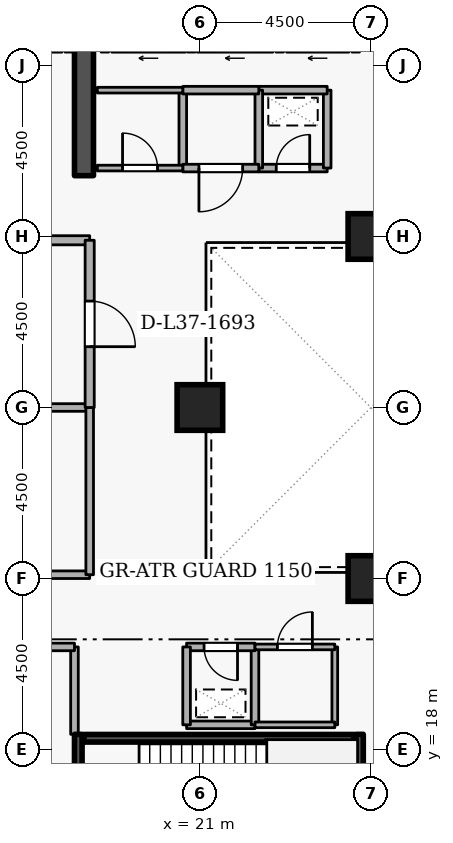
"""IFC4 building model, lengths in metres.
Left out: names, types, materials, properties, quantities, classifications, styles, units other than length and angle.
Written with IfcOpenShell. Run it as: python <this file> out.ifc"""

import sys

from ifc_helpers import new_model, si_unit, direction, frame, frame_2d, origin, origin_2d, place, context, subcontext, project, spatial, rectangle, extrude, element, fill, save


model = new_model("IFC4")
c1 = context("Model", 3, precision=1e-05, world=origin(), true_north=direction((0.0, 1.0)))
c2 = subcontext(c1, "Body", "Model", "MODEL_VIEW")
j1 = project(units=[si_unit("LENGTHUNIT", "METRE"), si_unit("PLANEANGLEUNIT", "RADIAN")], contexts=[c1])
p1 = place(None, origin())
s1 = spatial("IfcSite", under=j1, at=p1, CompositionType="ELEMENT")
p2 = place(p1, origin())
s2 = spatial("IfcBuilding", under=s1, at=p2, CompositionType="ELEMENT")
p3 = place(p2, frame((0.0, 0.0, 141.3)))
s3 = spatial("IfcBuildingStorey", under=s2, at=p3, CompositionType="ELEMENT", Elevation=141.3)
p4 = place(p3, frame((17.95, 33.1, 0.0), z_axis=(0.0, 0.0, 1.0), x_axis=(0.0, 1.0, 0.0)))
e1 = element("IfcWall", 1, at=p4, inside=s3, PredefinedType="SHEAR", context=c2, shape_type="SweptSolid", body=[
    extrude(rectangle(XDim=5.8, YDim=0.5, at=frame_2d((2.9, 0.0))), origin(), (0.0, 0.0, 1.0), 4.2),
])
for number, where, z_axis, x_axis in (
    (2, (25.5, 22.5, 0.0), (0.0, 0.0, 1.0), (1.0, 0.0, 0.0)),
    (3, (25.5, 31.5, 0.0), (0.0, 0.0, 1.0), (1.0, 0.0, 0.0)),
    (4, (21.0, 27.0, 0.0), (0.0, 0.0, 1.0), (1.0, 0.0, 0.0)),
):
    element("IfcColumn", number, at=place(p3, frame(where, z_axis=z_axis, x_axis=x_axis)), inside=s3, PredefinedType="COLUMN", context=c2, shape_type="SweptSolid", body=[
        extrude(rectangle(XDim=1.2, YDim=1.2, at=origin_2d()), origin(), (0.0, 0.0, 1.0), 4.2),
    ])
p5 = place(p3, frame((24.92, 36.45, 0.0), z_axis=(0.0, 0.0, 1.0), x_axis=(-1.0, 0.0, 0.0)))
e5 = element("IfcWall", 5, at=p5, inside=s3, PredefinedType="STANDARD", context=c2, shape_type="SweptSolid", body=[
    extrude(rectangle(XDim=1.64, YDim=0.2, at=frame_2d((0.82, 0.0))), origin(), (0.0, 0.0, 1.0), 3.94),
])
p6 = place(p5, frame((0.31, 0.0, 0.0)))
e6 = element("IfcOpeningElement", 6, at=p6, cuts=e5, PredefinedType="OPENING", context=c2, shape_type="SweptSolid", body=[
    extrude(rectangle(XDim=1.02, YDim=2.06, at=frame_2d((0.51, 1.03))), frame((0.0, 0.11, 0.0), z_axis=(0.0, -1.0, 0.0), x_axis=(1.0, 0.0, 0.0)), (0.0, 0.0, 1.0), 0.22),
])
p7 = place(p3, frame((22.92, 36.45, 0.0), z_axis=(0.0, 0.0, 1.0), x_axis=(-1.0, 0.0, 0.0)))
e7 = element("IfcWall", 7, at=p7, inside=s3, PredefinedType="STANDARD", context=c2, shape_type="SweptSolid", body=[
    extrude(rectangle(XDim=1.99, YDim=0.2, at=frame_2d((0.995, 0.0))), origin(), (0.0, 0.0, 1.0), 3.94),
])
p8 = place(p7, frame((0.485, 0.0, 0.0)))
e8 = element("IfcOpeningElement", 8, at=p8, cuts=e7, PredefinedType="OPENING", context=c2, shape_type="SweptSolid", body=[
    extrude(rectangle(XDim=1.02, YDim=2.06, at=frame_2d((0.51, 1.03))), frame((0.0, 0.11, 0.0), z_axis=(0.0, -1.0, 0.0), x_axis=(1.0, 0.0, 0.0)), (0.0, 0.0, 1.0), 0.22),
])
p9 = place(p3, frame((20.62, 36.45, 0.0), z_axis=(0.0, 0.0, 1.0), x_axis=(-1.0, 0.0, 0.0)))
e9 = element("IfcWall", 9, at=p9, inside=s3, PredefinedType="STANDARD", context=c2, shape_type="SweptSolid", body=[
    extrude(rectangle(XDim=1.94, YDim=0.2, at=frame_2d((0.97, 0.0))), origin(), (0.0, 0.0, 1.0), 3.94),
])
p10 = place(p9, frame((0.46, 0.0, 0.0)))
e10 = element("IfcOpeningElement", 10, at=p10, cuts=e9, PredefinedType="OPENING", context=c2, shape_type="SweptSolid", body=[
    extrude(rectangle(XDim=1.02, YDim=2.06, at=frame_2d((0.51, 1.03))), frame((0.0, 0.11, 0.0), z_axis=(0.0, -1.0, 0.0), x_axis=(1.0, 0.0, 0.0)), (0.0, 0.0, 1.0), 0.22),
])
p11 = place(p3, frame((17.37, 36.45, 0.0), z_axis=(0.0, 0.0, 1.0), x_axis=(-1.0, 0.0, 0.0)))
e11 = element("IfcWall", 11, at=p11, inside=s3, PredefinedType="STANDARD", context=c2, shape_type="SweptSolid", body=[
    extrude(rectangle(XDim=1.74, YDim=0.2, at=frame_2d((0.87, 0.0))), origin(), (0.0, 0.0, 1.0), 3.94),
])
p12 = place(p11, frame((0.36, 0.0, 0.0)))
e12 = element("IfcOpeningElement", 12, at=p12, cuts=e11, PredefinedType="OPENING", context=c2, shape_type="SweptSolid", body=[
    extrude(rectangle(XDim=1.02, YDim=2.06, at=frame_2d((0.51, 1.03))), frame((0.0, 0.11, 0.0), z_axis=(0.0, -1.0, 0.0), x_axis=(1.0, 0.0, 0.0)), (0.0, 0.0, 1.0), 0.22),
])
p13 = place(p3, frame((17.8, 15.05, 0.0), z_axis=(0.0, 0.0, 1.0), x_axis=(0.0, 1.0, 0.0)))
e13 = element("IfcWall", 13, at=p13, inside=s3, PredefinedType="SHEAR", context=c2, shape_type="SweptSolid", body=[
    extrude(rectangle(XDim=3.35, YDim=0.2, at=frame_2d((1.675, 0.0))), origin(), (0.0, 0.0, 1.0), 4.2),
])
p14 = place(p13, frame((1.125, 0.0, 0.0)))
e14 = element("IfcOpeningElement", 14, at=p14, cuts=e13, PredefinedType="OPENING", context=c2, shape_type="SweptSolid", body=[
    extrude(rectangle(XDim=1.1, YDim=2.1, at=frame_2d((0.55, 1.05))), frame((0.0, 0.11, 0.0), z_axis=(0.0, -1.0, 0.0), x_axis=(1.0, 0.0, 0.0)), (0.0, 0.0, 1.0), 0.22),
])
p15 = place(p3, frame((25.2, 18.4, 0.0), z_axis=(0.0, 0.0, 1.0), x_axis=(0.0, -1.0, 0.0)))
e15 = element("IfcWall", 15, at=p15, inside=s3, PredefinedType="SHEAR", context=c2, shape_type="SweptSolid", body=[
    extrude(rectangle(XDim=3.35, YDim=0.2, at=frame_2d((1.675, 0.0))), origin(), (0.0, 0.0, 1.0), 4.2),
])
p16 = place(p3, frame((25.05, 18.297, 0.0), z_axis=(0.0, 0.0, 1.0), x_axis=(-1.0, 0.0, 0.0)))
e16 = element("IfcWall", 16, at=p16, inside=s3, PredefinedType="SHEAR", context=c2, shape_type="SweptSolid", body=[
    extrude(rectangle(XDim=7.1, YDim=0.2, at=frame_2d((3.55, 0.0))), origin(), (0.0, 0.0, 1.0), 4.2),
])
p17 = place(p3, frame((17.7, 18.4, 0.0), z_axis=(0.0, 0.0, 1.0), x_axis=(0.0, 1.0, 0.0)))
e17 = element("IfcWall", 17, at=p17, inside=s3, PredefinedType="STANDARD", context=c2, shape_type="SweptSolid", body=[
    extrude(rectangle(XDim=2.3, YDim=0.2, at=frame_2d((1.15, 0.0))), origin(), (0.0, 0.0, 1.0), 3.145),
])
p18 = place(p3, frame((17.7, 20.7, 0.0), z_axis=(0.0, 0.0, 1.0), x_axis=(-1.0, 0.0, 0.0)))
e18 = element("IfcWall", 18, at=p18, inside=s3, PredefinedType="STANDARD", context=c2, shape_type="SweptSolid", body=[
    extrude(rectangle(XDim=2.5, YDim=0.2, at=frame_2d((1.25, 0.0))), origin(), (0.0, 0.0, 1.0), 3.94),
])
p19 = place(p18, frame((0.675, 0.0, 0.0)))
e19 = element("IfcOpeningElement", 19, at=p19, cuts=e18, PredefinedType="OPENING", context=c2, shape_type="SweptSolid", body=[
    extrude(rectangle(XDim=1.15, YDim=2.1, at=frame_2d((0.575, 1.05))), frame((0.0, 0.11, 0.0), z_axis=(0.0, -1.0, 0.0), x_axis=(1.0, 0.0, 0.0)), (0.0, 0.0, 1.0), 0.22),
])
p20 = place(p3, frame((20.65, 18.65, 0.0), z_axis=(0.0, 0.0, 1.0), x_axis=(1.0, 0.0, 0.0)))
e20 = element("IfcWall", 20, at=p20, inside=s3, PredefinedType="STANDARD", context=c2, shape_type="SweptSolid", body=[
    extrude(rectangle(XDim=1.8, YDim=0.2, at=frame_2d((0.9, 0.0))), origin(), (0.0, 0.0, 1.0), 3.94),
])
p21 = place(p3, frame((22.45, 18.65, 0.0), z_axis=(0.0, 0.0, 1.0), x_axis=(0.0, 1.0, 0.0)))
e21 = element("IfcWall", 21, at=p21, inside=s3, PredefinedType="STANDARD", context=c2, shape_type="SweptSolid", body=[
    extrude(rectangle(XDim=2.05, YDim=0.2, at=frame_2d((1.025, 0.0))), origin(), (0.0, 0.0, 1.0), 3.94),
])
p22 = place(p3, frame((22.45, 20.7, 0.0), z_axis=(0.0, 0.0, 1.0), x_axis=(-1.0, 0.0, 0.0)))
e22 = element("IfcWall", 22, at=p22, inside=s3, PredefinedType="STANDARD", context=c2, shape_type="SweptSolid", body=[
    extrude(rectangle(XDim=1.8, YDim=0.2, at=frame_2d((0.9, 0.0))), origin(), (0.0, 0.0, 1.0), 3.94),
])
p23 = place(p22, frame((0.46, 0.0, 0.0)))
e23 = element("IfcOpeningElement", 23, at=p23, cuts=e22, PredefinedType="OPENING", context=c2, shape_type="SweptSolid", body=[
    extrude(rectangle(XDim=0.88, YDim=2.04, at=frame_2d((0.44, 1.02))), frame((0.0, 0.11, 0.0), z_axis=(0.0, -1.0, 0.0), x_axis=(1.0, 0.0, 0.0)), (0.0, 0.0, 1.0), 0.22),
])
p24 = place(p3, frame((20.65, 20.7, 0.0), z_axis=(0.0, 0.0, 1.0), x_axis=(0.0, -1.0, 0.0)))
e24 = element("IfcWall", 24, at=p24, inside=s3, PredefinedType="STANDARD", context=c2, shape_type="SweptSolid", body=[
    extrude(rectangle(XDim=2.05, YDim=0.2, at=frame_2d((1.025, 0.0))), origin(), (0.0, 0.0, 1.0), 3.94),
])
p25 = place(p3, frame((22.55, 33.3, 0.0), z_axis=(0.0, 0.0, 1.0), x_axis=(1.0, 0.0, 0.0)))
e25 = element("IfcWall", 25, at=p25, inside=s3, PredefinedType="STANDARD", context=c2, shape_type="SweptSolid", body=[
    extrude(rectangle(XDim=1.8, YDim=0.2, at=frame_2d((0.9, 0.0))), origin(), (0.0, 0.0, 1.0), 3.94),
])
p26 = place(p25, frame((0.46, 0.0, 0.0)))
e26 = element("IfcOpeningElement", 26, at=p26, cuts=e25, PredefinedType="OPENING", context=c2, shape_type="SweptSolid", body=[
    extrude(rectangle(XDim=0.88, YDim=2.04, at=frame_2d((0.44, 1.02))), frame((0.0, 0.11, 0.0), z_axis=(0.0, -1.0, 0.0), x_axis=(1.0, 0.0, 0.0)), (0.0, 0.0, 1.0), 0.22),
])
p27 = place(p3, frame((24.35, 33.3, 0.0), z_axis=(0.0, 0.0, 1.0), x_axis=(0.0, 1.0, 0.0)))
e27 = element("IfcWall", 27, at=p27, inside=s3, PredefinedType="STANDARD", context=c2, shape_type="SweptSolid", body=[
    extrude(rectangle(XDim=2.05, YDim=0.2, at=frame_2d((1.025, 0.0))), origin(), (0.0, 0.0, 1.0), 3.94),
])
p28 = place(p3, frame((24.35, 35.35, 0.0), z_axis=(0.0, 0.0, 1.0), x_axis=(-1.0, 0.0, 0.0)))
e28 = element("IfcWall", 28, at=p28, inside=s3, PredefinedType="STANDARD", context=c2, shape_type="SweptSolid", body=[
    extrude(rectangle(XDim=1.8, YDim=0.2, at=frame_2d((0.9, 0.0))), origin(), (0.0, 0.0, 1.0), 3.94),
])
for number, where, z_axis, x_axis in (
    (29, (22.55, 35.35, 0.0), (0.0, 0.0, 1.0), (0.0, -1.0, 0.0)),
    (30, (20.55, 33.3, 0.0), (0.0, 0.0, 1.0), (0.0, 1.0, 0.0)),
):
    element("IfcWall", number, at=place(p3, frame(where, z_axis=z_axis, x_axis=x_axis)), inside=s3, PredefinedType="STANDARD", context=c2, shape_type="SweptSolid", body=[
        extrude(rectangle(XDim=2.05, YDim=0.2, at=frame_2d((1.025, 0.0))), origin(), (0.0, 0.0, 1.0), 3.94),
    ])
p29 = place(p3, frame((20.55, 35.35, 0.0), z_axis=(0.0, 0.0, 1.0), x_axis=(1.0, 0.0, 0.0)))
e31 = element("IfcWall", 31, at=p29, inside=s3, PredefinedType="STANDARD", context=c2, shape_type="SweptSolid", body=[
    extrude(rectangle(XDim=2.0, YDim=0.2, at=frame_2d((1.0, 0.0))), origin(), (0.0, 0.0, 1.0), 3.94),
])
p30 = place(p3, frame((22.55, 33.3, 0.0), z_axis=(0.0, 0.0, 1.0), x_axis=(-1.0, 0.0, 0.0)))
e32 = element("IfcWall", 32, at=p30, inside=s3, PredefinedType="STANDARD", context=c2, shape_type="SweptSolid", body=[
    extrude(rectangle(XDim=2.0, YDim=0.2, at=frame_2d((1.0, 0.0))), origin(), (0.0, 0.0, 1.0), 3.94),
])
p31 = place(p30, frame((0.425, 0.0, 0.0)))
e33 = element("IfcOpeningElement", 33, at=p31, cuts=e32, PredefinedType="OPENING", context=c2, shape_type="SweptSolid", body=[
    extrude(rectangle(XDim=1.15, YDim=2.1, at=frame_2d((0.575, 1.05))), frame((0.0, 0.11, 0.0), z_axis=(0.0, -1.0, 0.0), x_axis=(1.0, 0.0, 0.0)), (0.0, 0.0, 1.0), 0.22),
])
p32 = place(p3, frame((18.1, 22.6, 0.0), z_axis=(0.0, 0.0, 1.0), x_axis=(-1.0, 0.0, 0.0)))
e34 = element("IfcWall", 34, at=p32, inside=s3, PredefinedType="STANDARD", context=c2, shape_type="SweptSolid", body=[
    extrude(rectangle(XDim=2.9, YDim=0.2, at=frame_2d((1.45, 0.0))), origin(), (0.0, 0.0, 1.0), 3.94),
])
p33 = place(p3, frame((5.45, 27.0, 0.0), z_axis=(0.0, 0.0, 1.0), x_axis=(1.0, 0.0, 0.0)))
e35 = element("IfcWall", 35, at=p33, inside=s3, PredefinedType="STANDARD", context=c2, shape_type="SweptSolid", body=[
    extrude(rectangle(XDim=12.65, YDim=0.2, at=frame_2d((6.325, 0.0))), origin(), (0.0, 0.0, 1.0), 3.325),
])
p34 = place(p3, frame((18.1, 27.0, 0.0), z_axis=(0.0, 0.0, 1.0), x_axis=(0.0, -1.0, 0.0)))
e36 = element("IfcWall", 36, at=p34, inside=s3, PredefinedType="STANDARD", context=c2, shape_type="SweptSolid", body=[
    extrude(rectangle(XDim=4.4, YDim=0.2, at=frame_2d((2.2, 0.0))), origin(), (0.0, 0.0, 1.0), 3.145),
])
p35 = place(p3, frame((15.2, 31.4, 0.0), z_axis=(0.0, 0.0, 1.0), x_axis=(1.0, 0.0, 0.0)))
e37 = element("IfcWall", 37, at=p35, inside=s3, PredefinedType="STANDARD", context=c2, shape_type="SweptSolid", body=[
    extrude(rectangle(XDim=2.9, YDim=0.24, at=frame_2d((1.45, 0.0))), origin(), (0.0, 0.0, 1.0), 3.94),
])
p36 = place(p3, frame((18.1, 31.4, 0.0), z_axis=(0.0, 0.0, 1.0), x_axis=(0.0, -1.0, 0.0)))
e38 = element("IfcWall", 38, at=p36, inside=s3, PredefinedType="STANDARD", context=c2, shape_type="SweptSolid", body=[
    extrude(rectangle(XDim=4.4, YDim=0.24, at=frame_2d((2.2, 0.0))), origin(), (0.0, 0.0, 1.0), 3.145),
])
p37 = place(p36, frame((1.6, 0.0, 0.0)))
e39 = element("IfcOpeningElement", 39, at=p37, cuts=e38, PredefinedType="OPENING", context=c2, shape_type="SweptSolid", body=[
    extrude(rectangle(XDim=1.2, YDim=2.1, at=frame_2d((0.6, 1.05))), frame((0.0, 0.13, 0.0), z_axis=(0.0, -1.0, 0.0), x_axis=(1.0, 0.0, 0.0)), (0.0, 0.0, 1.0), 0.26),
])
p38 = place(p3, frame((24.55, 20.7, 0.0), z_axis=(0.0, 0.0, 1.0), x_axis=(0.0, -1.0, 0.0)))
e40 = element("IfcWall", 40, at=p38, inside=s3, PredefinedType="PARTITIONING", context=c2, shape_type="SweptSolid", body=[
    extrude(rectangle(XDim=2.05, YDim=0.15, at=frame_2d((1.025, 0.0))), origin(), (0.0, 0.0, 1.0), 3.94),
])
p39 = place(p3, frame((24.55, 18.65, 0.0), z_axis=(0.0, 0.0, 1.0), x_axis=(-1.0, 0.0, 0.0)))
e41 = element("IfcWall", 41, at=p39, inside=s3, PredefinedType="PARTITIONING", context=c2, shape_type="SweptSolid", body=[
    extrude(rectangle(XDim=2.1, YDim=0.15, at=frame_2d((1.05, 0.0))), origin(), (0.0, 0.0, 1.0), 3.94),
])
p40 = place(p3, frame((22.45, 20.7, 0.0), z_axis=(0.0, 0.0, 1.0), x_axis=(1.0, 0.0, 0.0)))
e42 = element("IfcWall", 42, at=p40, inside=s3, PredefinedType="PARTITIONING", context=c2, shape_type="SweptSolid", body=[
    extrude(rectangle(XDim=2.1, YDim=0.15, at=frame_2d((1.05, 0.0))), origin(), (0.0, 0.0, 1.0), 3.94),
])
p41 = place(p40, frame((0.59, 0.0, 0.0)))
e43 = element("IfcOpeningElement", 43, at=p41, cuts=e42, PredefinedType="OPENING", context=c2, shape_type="SweptSolid", body=[
    extrude(rectangle(XDim=0.92, YDim=2.08, at=frame_2d((0.46, 1.04))), frame((0.0, 0.085, 0.0), z_axis=(0.0, -1.0, 0.0), x_axis=(1.0, 0.0, 0.0)), (0.0, 0.0, 1.0), 0.17),
])
p42 = place(p3, frame((18.3, 33.3, 0.0), z_axis=(0.0, 0.0, 1.0), x_axis=(1.0, 0.0, 0.0)))
e44 = element("IfcWall", 44, at=p42, inside=s3, PredefinedType="PARTITIONING", context=c2, shape_type="SweptSolid", body=[
    extrude(rectangle(XDim=2.25, YDim=0.15, at=frame_2d((1.125, 0.0))), origin(), (0.0, 0.0, 1.0), 3.94),
])
p43 = place(p42, frame((0.665, 0.0, 0.0)))
e45 = element("IfcOpeningElement", 45, at=p43, cuts=e44, PredefinedType="OPENING", context=c2, shape_type="SweptSolid", body=[
    extrude(rectangle(XDim=0.92, YDim=2.08, at=frame_2d((0.46, 1.04))), frame((0.0, 0.085, 0.0), z_axis=(0.0, -1.0, 0.0), x_axis=(1.0, 0.0, 0.0)), (0.0, 0.0, 1.0), 0.17),
])
p44 = place(p3, frame((20.55, 35.35, 0.0), z_axis=(0.0, 0.0, 1.0), x_axis=(-1.0, 0.0, 0.0)))
e46 = element("IfcWall", 46, at=p44, inside=s3, PredefinedType="PARTITIONING", context=c2, shape_type="SweptSolid", body=[
    extrude(rectangle(XDim=2.25, YDim=0.15, at=frame_2d((1.125, 0.0))), origin(), (0.0, 0.0, 1.0), 3.94),
])
p45 = place(p23, origin())
e47 = element("IfcDoor", 47, at=p45, inside=s3, OperationType="SINGLE_SWING_LEFT", PredefinedType="DOOR", context=c2, shape_type="SweptSolid", body=[
    extrude(rectangle(XDim=0.88, YDim=2.04, at=frame_2d((0.44, 1.02))), frame((0.0, 0.025, 0.0), z_axis=(0.0, -1.0, 0.0), x_axis=(1.0, 0.0, 0.0)), (0.0, 0.0, 1.0), 0.05),
])
fill(e23, e47)
p46 = place(p26, origin())
e48 = element("IfcDoor", 48, at=p46, inside=s3, OperationType="SINGLE_SWING_RIGHT", PredefinedType="DOOR", context=c2, shape_type="SweptSolid", body=[
    extrude(rectangle(XDim=0.88, YDim=2.04, at=frame_2d((0.44, 1.02))), frame((0.0, 0.025, 0.0), z_axis=(0.0, -1.0, 0.0), x_axis=(1.0, 0.0, 0.0)), (0.0, 0.0, 1.0), 0.05),
])
fill(e26, e48)
p47 = place(p41, origin())
e49 = element("IfcDoor", 49, at=p47, inside=s3, OperationType="SINGLE_SWING_RIGHT", PredefinedType="DOOR", context=c2, shape_type="SweptSolid", body=[
    extrude(rectangle(XDim=0.92, YDim=2.08, at=frame_2d((0.46, 1.04))), frame((0.0, 0.025, 0.0), z_axis=(0.0, -1.0, 0.0), x_axis=(1.0, 0.0, 0.0)), (0.0, 0.0, 1.0), 0.05),
])
fill(e43, e49)
p48 = place(p43, origin())
e50 = element("IfcDoor", 50, at=p48, inside=s3, OperationType="SINGLE_SWING_LEFT", PredefinedType="DOOR", context=c2, shape_type="SweptSolid", body=[
    extrude(rectangle(XDim=0.92, YDim=2.08, at=frame_2d((0.46, 1.04))), frame((0.0, 0.025, 0.0), z_axis=(0.0, -1.0, 0.0), x_axis=(1.0, 0.0, 0.0)), (0.0, 0.0, 1.0), 0.05),
])
fill(e45, e50)
p49 = place(p31, origin())
e51 = element("IfcDoor", 51, at=p49, inside=s3, OperationType="SINGLE_SWING_RIGHT", PredefinedType="DOOR", context=c2, shape_type="SweptSolid", body=[
    extrude(rectangle(XDim=1.15, YDim=2.1, at=frame_2d((0.575, 1.05))), frame((0.0, 0.025, 0.0), z_axis=(0.0, -1.0, 0.0), x_axis=(1.0, 0.0, 0.0)), (0.0, 0.0, 1.0), 0.05),
])
fill(e33, e51)
p50 = place(p37, origin())
e52 = element("IfcDoor", 52, at=p50, inside=s3, OperationType="SINGLE_SWING_RIGHT", PredefinedType="DOOR", context=c2, shape_type="SweptSolid", body=[
    extrude(rectangle(XDim=1.2, YDim=2.1, at=frame_2d((0.6, 1.05))), frame((0.0, 0.025, 0.0), z_axis=(0.0, -1.0, 0.0), x_axis=(1.0, 0.0, 0.0)), (0.0, 0.0, 1.0), 0.05),
])
fill(e39, e52)
save(model, sys.argv[1])
